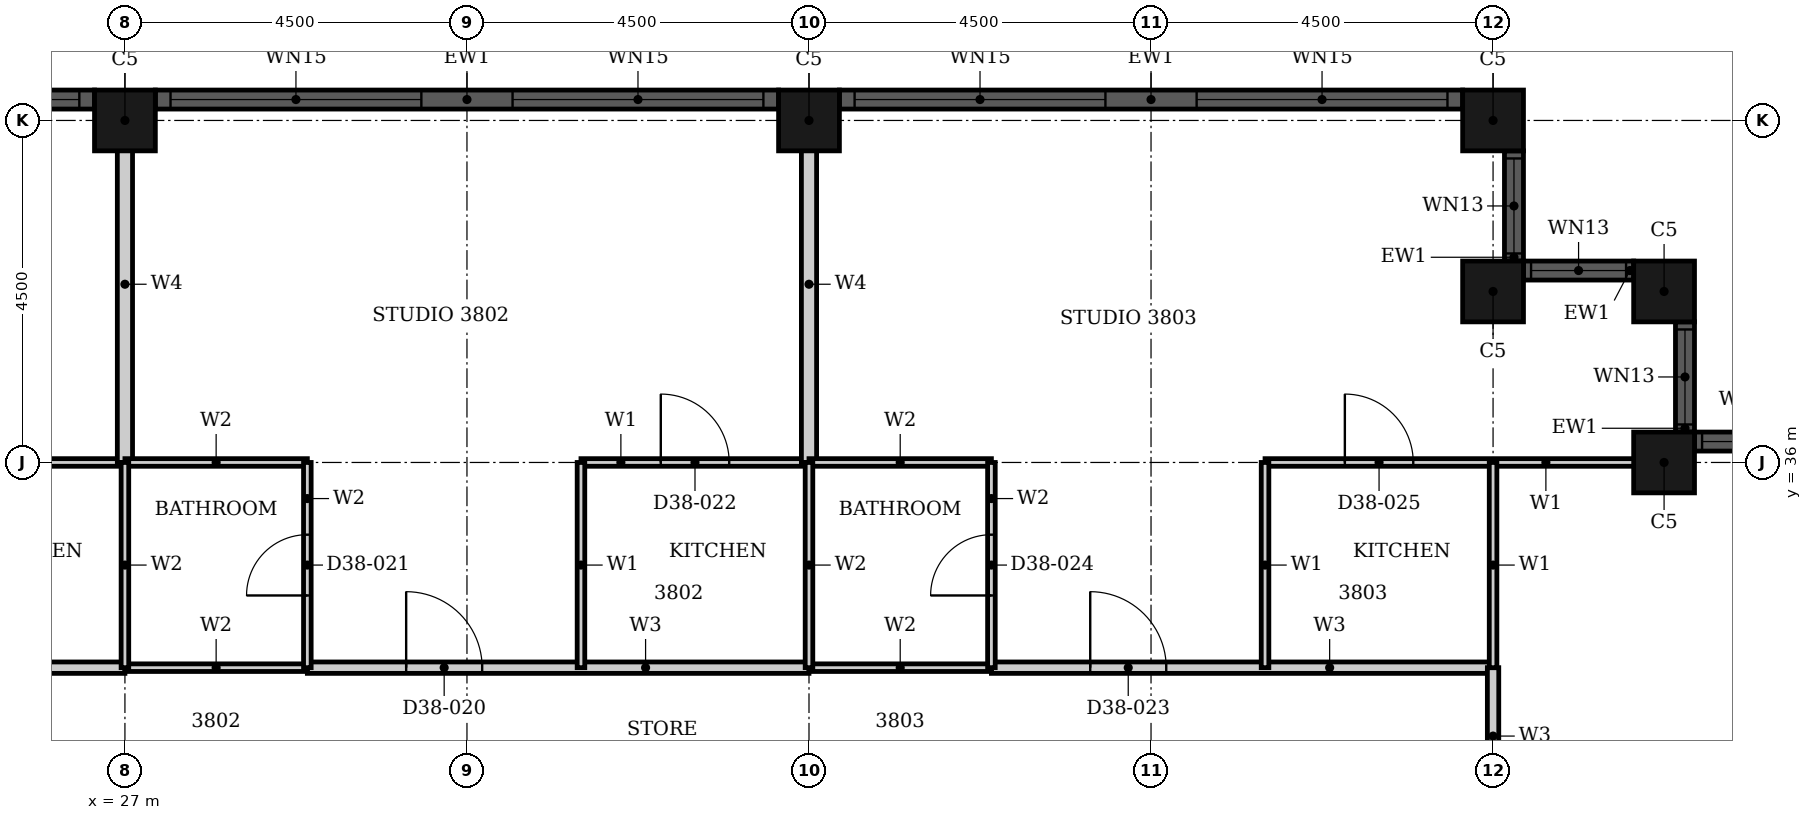
"""IFC4 building model, lengths in metres.
Left out: names, types, materials, properties, quantities, classifications, styles, units other than length and angle.
Written with IfcOpenShell. Run it as: python <this file> out.ifc"""

import sys

from ifc_helpers import new_model, si_unit, direction, frame, frame_2d, origin, origin_2d, place, context, subcontext, project, spatial, rectangle, hollow_rectangle, extrude, element, fill, save


model = new_model("IFC4")
c1 = context("Model", 3, precision=1e-05, world=origin(), true_north=direction((0.0, 1.0)))
c2 = subcontext(c1, "Body", "Model", "MODEL_VIEW")
j1 = project(units=[si_unit("LENGTHUNIT", "METRE"), si_unit("PLANEANGLEUNIT", "RADIAN")], contexts=[c1])
p1 = place(None, origin())
s1 = spatial("IfcSite", under=j1, at=p1, CompositionType="ELEMENT")
p2 = place(p1, origin())
s2 = spatial("IfcBuilding", under=s1, at=p2, CompositionType="ELEMENT")
p3 = place(p2, frame((0.0, 0.0, 154.3)))
s3 = spatial("IfcBuildingStorey", under=s2, at=p3, CompositionType="ELEMENT", Elevation=154.3)
for number, where, z_axis, x_axis in (
    (1, (47.25, 36.0, 0.0), (0.0, 0.0, 1.0), (1.0, 0.0, 0.0)),
    (2, (47.25, 38.25, 0.0), (0.0, 0.0, 1.0), (1.0, 0.0, 0.0)),
    (3, (45.0, 38.25, 0.0), (0.0, 0.0, 1.0), (1.0, 0.0, 0.0)),
    (4, (45.0, 40.5, 0.0), (0.0, 0.0, 1.0), (1.0, 0.0, 0.0)),
    (5, (36.0, 40.5, 0.0), (0.0, 0.0, 1.0), (1.0, 0.0, 0.0)),
    (6, (27.0, 40.5, 0.0), (0.0, 0.0, 1.0), (1.0, 0.0, 0.0)),
):
    element("IfcColumn", number, at=place(p3, frame(where, z_axis=z_axis, x_axis=x_axis)), inside=s3, PredefinedType="COLUMN", context=c2, shape_type="SweptSolid", body=[
        extrude(hollow_rectangle(XDim=0.8, YDim=0.8, WallThickness=0.025, at=origin_2d()), origin(), (0.0, 0.0, 1.0), 3.7),
    ])
p4 = place(p3, frame((49.1, 36.275, 0.0), z_axis=(0.0, 0.0, 1.0), x_axis=(-1.0, 0.0, 0.0)))
e7 = element("IfcWall", 7, at=p4, inside=s3, PredefinedType="SOLIDWALL", context=c2, shape_type="SweptSolid", body=[
    extrude(rectangle(XDim=1.45, YDim=0.25, at=frame_2d((0.725, 0.0))), origin(), (0.0, 0.0, 1.0), 3.7),
])
p5 = place(p4, frame((0.1, 0.0, 0.9)))
e8 = element("IfcOpeningElement", 8, at=p5, cuts=e7, PredefinedType="OPENING", context=c2, shape_type="SweptSolid", body=[
    extrude(rectangle(XDim=1.25, YDim=1.85, at=frame_2d((0.625, 0.925))), frame((0.0, 0.135, 0.0), z_axis=(0.0, -1.0, 0.0), x_axis=(1.0, 0.0, 0.0)), (0.0, 0.0, 1.0), 0.27),
])
p6 = place(p3, frame((47.525, 36.4, 0.0), z_axis=(0.0, 0.0, 1.0), x_axis=(0.0, 1.0, 0.0)))
e9 = element("IfcWall", 9, at=p6, inside=s3, PredefinedType="SOLIDWALL", context=c2, shape_type="SweptSolid", body=[
    extrude(rectangle(XDim=1.45, YDim=0.25, at=frame_2d((0.725, 0.0))), origin(), (0.0, 0.0, 1.0), 3.7),
])
p7 = place(p6, frame((0.1, 0.0, 0.9)))
e10 = element("IfcOpeningElement", 10, at=p7, cuts=e9, PredefinedType="OPENING", context=c2, shape_type="SweptSolid", body=[
    extrude(rectangle(XDim=1.25, YDim=1.85, at=frame_2d((0.625, 0.925))), frame((0.0, 0.135, 0.0), z_axis=(0.0, -1.0, 0.0), x_axis=(1.0, 0.0, 0.0)), (0.0, 0.0, 1.0), 0.27),
])
p8 = place(p3, frame((46.85, 38.525, 0.0), z_axis=(0.0, 0.0, 1.0), x_axis=(-1.0, 0.0, 0.0)))
e11 = element("IfcWall", 11, at=p8, inside=s3, PredefinedType="SOLIDWALL", context=c2, shape_type="SweptSolid", body=[
    extrude(rectangle(XDim=1.45, YDim=0.25, at=frame_2d((0.725, 0.0))), origin(), (0.0, 0.0, 1.0), 3.7),
])
p9 = place(p8, frame((0.1, 0.0, 0.9)))
e12 = element("IfcOpeningElement", 12, at=p9, cuts=e11, PredefinedType="OPENING", context=c2, shape_type="SweptSolid", body=[
    extrude(rectangle(XDim=1.25, YDim=1.85, at=frame_2d((0.625, 0.925))), frame((0.0, 0.135, 0.0), z_axis=(0.0, -1.0, 0.0), x_axis=(1.0, 0.0, 0.0)), (0.0, 0.0, 1.0), 0.27),
])
p10 = place(p3, frame((45.275, 38.65, 0.0), z_axis=(0.0, 0.0, 1.0), x_axis=(0.0, 1.0, 0.0)))
e13 = element("IfcWall", 13, at=p10, inside=s3, PredefinedType="SOLIDWALL", context=c2, shape_type="SweptSolid", body=[
    extrude(rectangle(XDim=1.45, YDim=0.25, at=frame_2d((0.725, 0.0))), origin(), (0.0, 0.0, 1.0), 3.7),
])
p11 = place(p10, frame((0.1, 0.0, 0.9)))
e14 = element("IfcOpeningElement", 14, at=p11, cuts=e13, PredefinedType="OPENING", context=c2, shape_type="SweptSolid", body=[
    extrude(rectangle(XDim=1.25, YDim=1.85, at=frame_2d((0.625, 0.925))), frame((0.0, 0.135, 0.0), z_axis=(0.0, -1.0, 0.0), x_axis=(1.0, 0.0, 0.0)), (0.0, 0.0, 1.0), 0.27),
])
p12 = place(p3, frame((44.6, 40.775, 0.0), z_axis=(0.0, 0.0, 1.0), x_axis=(-1.0, 0.0, 0.0)))
e15 = element("IfcWall", 15, at=p12, inside=s3, PredefinedType="SOLIDWALL", context=c2, shape_type="SweptSolid", body=[
    extrude(rectangle(XDim=8.2, YDim=0.25, at=frame_2d((4.1, 0.0))), origin(), (0.0, 0.0, 1.0), 3.7),
])
p13 = place(p12, frame((0.2, 0.0, 0.45)))
e16 = element("IfcOpeningElement", 16, at=p13, cuts=e15, PredefinedType="OPENING", context=c2, shape_type="SweptSolid", body=[
    extrude(rectangle(XDim=3.3, YDim=2.3, at=frame_2d((1.65, 1.15))), frame((0.0, 0.135, 0.0), z_axis=(0.0, -1.0, 0.0), x_axis=(1.0, 0.0, 0.0)), (0.0, 0.0, 1.0), 0.27),
])
p14 = place(p12, frame((4.7, 0.0, 0.45)))
e17 = element("IfcOpeningElement", 17, at=p14, cuts=e15, PredefinedType="OPENING", context=c2, shape_type="SweptSolid", body=[
    extrude(rectangle(XDim=3.3, YDim=2.3, at=frame_2d((1.65, 1.15))), frame((0.0, 0.135, 0.0), z_axis=(0.0, -1.0, 0.0), x_axis=(1.0, 0.0, 0.0)), (0.0, 0.0, 1.0), 0.27),
])
p15 = place(p3, frame((35.6, 40.775, 0.0), z_axis=(0.0, 0.0, 1.0), x_axis=(-1.0, 0.0, 0.0)))
e18 = element("IfcWall", 18, at=p15, inside=s3, PredefinedType="SOLIDWALL", context=c2, shape_type="SweptSolid", body=[
    extrude(rectangle(XDim=8.2, YDim=0.25, at=frame_2d((4.1, 0.0))), origin(), (0.0, 0.0, 1.0), 3.7),
])
p16 = place(p15, frame((0.2, 0.0, 0.45)))
e19 = element("IfcOpeningElement", 19, at=p16, cuts=e18, PredefinedType="OPENING", context=c2, shape_type="SweptSolid", body=[
    extrude(rectangle(XDim=3.3, YDim=2.3, at=frame_2d((1.65, 1.15))), frame((0.0, 0.135, 0.0), z_axis=(0.0, -1.0, 0.0), x_axis=(1.0, 0.0, 0.0)), (0.0, 0.0, 1.0), 0.27),
])
p17 = place(p15, frame((4.7, 0.0, 0.45)))
e20 = element("IfcOpeningElement", 20, at=p17, cuts=e18, PredefinedType="OPENING", context=c2, shape_type="SweptSolid", body=[
    extrude(rectangle(XDim=3.3, YDim=2.3, at=frame_2d((1.65, 1.15))), frame((0.0, 0.135, 0.0), z_axis=(0.0, -1.0, 0.0), x_axis=(1.0, 0.0, 0.0)), (0.0, 0.0, 1.0), 0.27),
])
p18 = place(p3, frame((26.6, 40.775, 0.0), z_axis=(0.0, 0.0, 1.0), x_axis=(-1.0, 0.0, 0.0)))
e21 = element("IfcWall", 21, at=p18, inside=s3, PredefinedType="SOLIDWALL", context=c2, shape_type="SweptSolid", body=[
    extrude(rectangle(XDim=8.2, YDim=0.25, at=frame_2d((4.1, 0.0))), origin(), (0.0, 0.0, 1.0), 3.7),
])
p19 = place(p18, frame((0.2, 0.0, 0.45)))
e22 = element("IfcOpeningElement", 22, at=p19, cuts=e21, PredefinedType="OPENING", context=c2, shape_type="SweptSolid", body=[
    extrude(rectangle(XDim=3.3, YDim=2.3, at=frame_2d((1.65, 1.15))), frame((0.0, 0.135, 0.0), z_axis=(0.0, -1.0, 0.0), x_axis=(1.0, 0.0, 0.0)), (0.0, 0.0, 1.0), 0.27),
])
p20 = place(p18, frame((4.7, 0.0, 0.45)))
e23 = element("IfcOpeningElement", 23, at=p20, cuts=e21, PredefinedType="OPENING", context=c2, shape_type="SweptSolid", body=[
    extrude(rectangle(XDim=3.3, YDim=2.3, at=frame_2d((1.65, 1.15))), frame((0.0, 0.135, 0.0), z_axis=(0.0, -1.0, 0.0), x_axis=(1.0, 0.0, 0.0)), (0.0, 0.0, 1.0), 0.27),
])
p21 = place(p3, frame((20.4, 33.3, 0.0), z_axis=(0.0, 0.0, 1.0), x_axis=(1.0, 0.0, 0.0)))
e24 = element("IfcWall", 24, at=p21, inside=s3, PredefinedType="PARTITIONING", context=c2, shape_type="SweptSolid", body=[
    extrude(rectangle(XDim=6.6, YDim=0.15, at=frame_2d((3.3, 0.0))), origin(), (0.0, 0.0, 1.0), 3.4),
])
p22 = place(p21, frame((1.3, 0.0, 0.0)))
e25 = element("IfcOpeningElement", 25, at=p22, cuts=e24, PredefinedType="OPENING", context=c2, shape_type="SweptSolid", body=[
    extrude(rectangle(XDim=1.0, YDim=2.2, at=frame_2d((0.5, 1.1))), frame((0.0, 0.085, 0.0), z_axis=(0.0, -1.0, 0.0), x_axis=(1.0, 0.0, 0.0)), (0.0, 0.0, 1.0), 0.17),
])
p23 = place(p3, frame((29.4, 33.3, 0.0), z_axis=(0.0, 0.0, 1.0), x_axis=(1.0, 0.0, 0.0)))
e26 = element("IfcWall", 26, at=p23, inside=s3, PredefinedType="PARTITIONING", context=c2, shape_type="SweptSolid", body=[
    extrude(rectangle(XDim=6.6, YDim=0.15, at=frame_2d((3.3, 0.0))), origin(), (0.0, 0.0, 1.0), 3.4),
])
p24 = place(p23, frame((1.3, 0.0, 0.0)))
e27 = element("IfcOpeningElement", 27, at=p24, cuts=e26, PredefinedType="OPENING", context=c2, shape_type="SweptSolid", body=[
    extrude(rectangle(XDim=1.0, YDim=2.2, at=frame_2d((0.5, 1.1))), frame((0.0, 0.085, 0.0), z_axis=(0.0, -1.0, 0.0), x_axis=(1.0, 0.0, 0.0)), (0.0, 0.0, 1.0), 0.17),
])
p25 = place(p3, frame((38.4, 33.3, 0.0), z_axis=(0.0, 0.0, 1.0), x_axis=(1.0, 0.0, 0.0)))
e28 = element("IfcWall", 28, at=p25, inside=s3, PredefinedType="PARTITIONING", context=c2, shape_type="SweptSolid", body=[
    extrude(rectangle(XDim=6.6, YDim=0.15, at=frame_2d((3.3, 0.0))), origin(), (0.0, 0.0, 1.0), 3.4),
])
p26 = place(p25, frame((1.3, 0.0, 0.0)))
e29 = element("IfcOpeningElement", 29, at=p26, cuts=e28, PredefinedType="OPENING", context=c2, shape_type="SweptSolid", body=[
    extrude(rectangle(XDim=1.0, YDim=2.2, at=frame_2d((0.5, 1.1))), frame((0.0, 0.085, 0.0), z_axis=(0.0, -1.0, 0.0), x_axis=(1.0, 0.0, 0.0)), (0.0, 0.0, 1.0), 0.17),
])
p27 = place(p3, frame((45.0, 31.5, 0.0), z_axis=(0.0, 0.0, 1.0), x_axis=(0.0, 1.0, 0.0)))
e30 = element("IfcWall", 30, at=p27, inside=s3, PredefinedType="PARTITIONING", context=c2, shape_type="SweptSolid", body=[
    extrude(rectangle(XDim=1.8, YDim=0.15, at=frame_2d((0.9, 0.0))), origin(), (0.0, 0.0, 1.0), 3.4),
])
p28 = place(p3, frame((24.0, 36.0, 0.0), z_axis=(0.0, 0.0, 1.0), x_axis=(1.0, 0.0, 0.0)))
e31 = element("IfcWall", 31, at=p28, inside=s3, PredefinedType="PARTITIONING", context=c2, shape_type="SweptSolid", body=[
    extrude(rectangle(XDim=3.0, YDim=0.1, at=frame_2d((1.5, 0.0))), origin(), (0.0, 0.0, 1.0), 3.4),
])
p29 = place(p28, frame((1.05, 0.0, 0.0)))
e32 = element("IfcOpeningElement", 32, at=p29, cuts=e31, PredefinedType="OPENING", context=c2, shape_type="SweptSolid", body=[
    extrude(rectangle(XDim=0.9, YDim=2.1, at=frame_2d((0.45, 1.05))), frame((0.0, 0.06, 0.0), z_axis=(0.0, -1.0, 0.0), x_axis=(1.0, 0.0, 0.0)), (0.0, 0.0, 1.0), 0.12),
])
p30 = place(p3, frame((33.0, 36.0, 0.0), z_axis=(0.0, 0.0, 1.0), x_axis=(1.0, 0.0, 0.0)))
e33 = element("IfcWall", 33, at=p30, inside=s3, PredefinedType="PARTITIONING", context=c2, shape_type="SweptSolid", body=[
    extrude(rectangle(XDim=3.0, YDim=0.1, at=frame_2d((1.5, 0.0))), origin(), (0.0, 0.0, 1.0), 3.4),
])
p31 = place(p30, frame((1.05, 0.0, 0.0)))
e34 = element("IfcOpeningElement", 34, at=p31, cuts=e33, PredefinedType="OPENING", context=c2, shape_type="SweptSolid", body=[
    extrude(rectangle(XDim=0.9, YDim=2.1, at=frame_2d((0.45, 1.05))), frame((0.0, 0.06, 0.0), z_axis=(0.0, -1.0, 0.0), x_axis=(1.0, 0.0, 0.0)), (0.0, 0.0, 1.0), 0.12),
])
p32 = place(p3, frame((42.0, 36.0, 0.0), z_axis=(0.0, 0.0, 1.0), x_axis=(1.0, 0.0, 0.0)))
e35 = element("IfcWall", 35, at=p32, inside=s3, PredefinedType="PARTITIONING", context=c2, shape_type="SweptSolid", body=[
    extrude(rectangle(XDim=5.44, YDim=0.1, at=frame_2d((2.72, 0.0))), origin(), (0.0, 0.0, 1.0), 3.4),
])
p33 = place(p32, frame((1.05, 0.0, 0.0)))
e36 = element("IfcOpeningElement", 36, at=p33, cuts=e35, PredefinedType="OPENING", context=c2, shape_type="SweptSolid", body=[
    extrude(rectangle(XDim=0.9, YDim=2.1, at=frame_2d((0.45, 1.05))), frame((0.0, 0.06, 0.0), z_axis=(0.0, -1.0, 0.0), x_axis=(1.0, 0.0, 0.0)), (0.0, 0.0, 1.0), 0.12),
])
for number, where, z_axis, x_axis in (
    (37, (33.0, 33.3, 0.0), (0.0, 0.0, 1.0), (0.0, 1.0, 0.0)),
    (38, (42.0, 33.3, 0.0), (0.0, 0.0, 1.0), (0.0, 1.0, 0.0)),
    (39, (45.0, 33.3, 0.0), (0.0, 0.0, 1.0), (0.0, 1.0, 0.0)),
):
    element("IfcWall", number, at=place(p3, frame(where, z_axis=z_axis, x_axis=x_axis)), inside=s3, PredefinedType="PARTITIONING", context=c2, shape_type="SweptSolid", body=[
        extrude(rectangle(XDim=2.7, YDim=0.1, at=frame_2d((1.35, 0.0))), origin(), (0.0, 0.0, 1.0), 3.4),
    ])
for number, where, z_axis, x_axis in (
    (40, (27.0, 36.0, 0.0), (0.0, 0.0, 1.0), (0.0, 1.0, 0.0)),
    (41, (36.0, 36.0, 0.0), (0.0, 0.0, 1.0), (0.0, 1.0, 0.0)),
):
    element("IfcWall", number, at=place(p3, frame(where, z_axis=z_axis, x_axis=x_axis)), inside=s3, PredefinedType="PARTITIONING", context=c2, shape_type="SweptSolid", body=[
        extrude(rectangle(XDim=4.69, YDim=0.2, at=frame_2d((2.345, 0.0))), origin(), (0.0, 0.0, 1.0), 3.4),
    ])
for number, where, z_axis, x_axis in (
    (42, (27.0, 33.3, 0.0), (0.0, 0.0, 1.0), (1.0, 0.0, 0.0)),
    (43, (36.0, 33.3, 0.0), (0.0, 0.0, 1.0), (1.0, 0.0, 0.0)),
    (44, (27.0, 36.0, 0.0), (0.0, 0.0, 1.0), (1.0, 0.0, 0.0)),
    (45, (36.0, 36.0, 0.0), (0.0, 0.0, 1.0), (1.0, 0.0, 0.0)),
):
    element("IfcWall", number, at=place(p3, frame(where, z_axis=z_axis, x_axis=x_axis)), inside=s3, PredefinedType="PARTITIONING", context=c2, shape_type="SweptSolid", body=[
        extrude(rectangle(XDim=2.4, YDim=0.1, at=frame_2d((1.2, 0.0))), origin(), (0.0, 0.0, 1.0), 3.4),
    ])
p34 = place(p3, frame((27.0, 33.3, 0.0), z_axis=(0.0, 0.0, 1.0), x_axis=(0.0, 1.0, 0.0)))
e46 = element("IfcWall", 46, at=p34, inside=s3, PredefinedType="PARTITIONING", context=c2, shape_type="SweptSolid", body=[
    extrude(rectangle(XDim=2.7, YDim=0.1, at=frame_2d((1.35, 0.0))), origin(), (0.0, 0.0, 1.0), 3.4),
])
p35 = place(p3, frame((29.4, 33.3, 0.0), z_axis=(0.0, 0.0, 1.0), x_axis=(0.0, 1.0, 0.0)))
e47 = element("IfcWall", 47, at=p35, inside=s3, PredefinedType="PARTITIONING", context=c2, shape_type="SweptSolid", body=[
    extrude(rectangle(XDim=2.7, YDim=0.1, at=frame_2d((1.35, 0.0))), origin(), (0.0, 0.0, 1.0), 3.4),
])
p36 = place(p35, frame((0.95, 0.0, 0.0)))
e48 = element("IfcOpeningElement", 48, at=p36, cuts=e47, PredefinedType="OPENING", context=c2, shape_type="SweptSolid", body=[
    extrude(rectangle(XDim=0.8, YDim=2.1, at=frame_2d((0.4, 1.05))), frame((0.0, 0.06, 0.0), z_axis=(0.0, -1.0, 0.0), x_axis=(1.0, 0.0, 0.0)), (0.0, 0.0, 1.0), 0.12),
])
p37 = place(p3, frame((36.0, 33.3, 0.0), z_axis=(0.0, 0.0, 1.0), x_axis=(0.0, 1.0, 0.0)))
e49 = element("IfcWall", 49, at=p37, inside=s3, PredefinedType="PARTITIONING", context=c2, shape_type="SweptSolid", body=[
    extrude(rectangle(XDim=2.7, YDim=0.1, at=frame_2d((1.35, 0.0))), origin(), (0.0, 0.0, 1.0), 3.4),
])
p38 = place(p3, frame((38.4, 33.3, 0.0), z_axis=(0.0, 0.0, 1.0), x_axis=(0.0, 1.0, 0.0)))
e50 = element("IfcWall", 50, at=p38, inside=s3, PredefinedType="PARTITIONING", context=c2, shape_type="SweptSolid", body=[
    extrude(rectangle(XDim=2.7, YDim=0.1, at=frame_2d((1.35, 0.0))), origin(), (0.0, 0.0, 1.0), 3.4),
])
p39 = place(p38, frame((0.95, 0.0, 0.0)))
e51 = element("IfcOpeningElement", 51, at=p39, cuts=e50, PredefinedType="OPENING", context=c2, shape_type="SweptSolid", body=[
    extrude(rectangle(XDim=0.8, YDim=2.1, at=frame_2d((0.4, 1.05))), frame((0.0, 0.06, 0.0), z_axis=(0.0, -1.0, 0.0), x_axis=(1.0, 0.0, 0.0)), (0.0, 0.0, 1.0), 0.12),
])
p40 = place(p5, origin())
e52 = element("IfcWindow", 52, at=p40, inside=s3, PartitioningType="SINGLE_PANEL", PredefinedType="WINDOW", context=c2, shape_type="SweptSolid", body=[
    extrude(rectangle(XDim=1.25, YDim=1.85, at=frame_2d((0.625, 0.925))), frame((0.0, 0.03, 0.0), z_axis=(0.0, -1.0, 0.0), x_axis=(1.0, 0.0, 0.0)), (0.0, 0.0, 1.0), 0.06),
])
fill(e8, e52)
p41 = place(p7, origin())
e53 = element("IfcWindow", 53, at=p41, inside=s3, PartitioningType="SINGLE_PANEL", PredefinedType="WINDOW", context=c2, shape_type="SweptSolid", body=[
    extrude(rectangle(XDim=1.25, YDim=1.85, at=frame_2d((0.625, 0.925))), frame((0.0, 0.03, 0.0), z_axis=(0.0, -1.0, 0.0), x_axis=(1.0, 0.0, 0.0)), (0.0, 0.0, 1.0), 0.06),
])
fill(e10, e53)
p42 = place(p9, origin())
e54 = element("IfcWindow", 54, at=p42, inside=s3, PartitioningType="SINGLE_PANEL", PredefinedType="WINDOW", context=c2, shape_type="SweptSolid", body=[
    extrude(rectangle(XDim=1.25, YDim=1.85, at=frame_2d((0.625, 0.925))), frame((0.0, 0.03, 0.0), z_axis=(0.0, -1.0, 0.0), x_axis=(1.0, 0.0, 0.0)), (0.0, 0.0, 1.0), 0.06),
])
fill(e12, e54)
p43 = place(p11, origin())
e55 = element("IfcWindow", 55, at=p43, inside=s3, PartitioningType="SINGLE_PANEL", PredefinedType="WINDOW", context=c2, shape_type="SweptSolid", body=[
    extrude(rectangle(XDim=1.25, YDim=1.85, at=frame_2d((0.625, 0.925))), frame((0.0, 0.03, 0.0), z_axis=(0.0, -1.0, 0.0), x_axis=(1.0, 0.0, 0.0)), (0.0, 0.0, 1.0), 0.06),
])
fill(e14, e55)
p44 = place(p13, origin())
e56 = element("IfcWindow", 56, at=p44, inside=s3, PartitioningType="SINGLE_PANEL", PredefinedType="WINDOW", context=c2, shape_type="SweptSolid", body=[
    extrude(rectangle(XDim=3.3, YDim=2.3, at=frame_2d((1.65, 1.15))), frame((0.0, 0.03, 0.0), z_axis=(0.0, -1.0, 0.0), x_axis=(1.0, 0.0, 0.0)), (0.0, 0.0, 1.0), 0.06),
])
fill(e16, e56)
p45 = place(p14, origin())
e57 = element("IfcWindow", 57, at=p45, inside=s3, PartitioningType="SINGLE_PANEL", PredefinedType="WINDOW", context=c2, shape_type="SweptSolid", body=[
    extrude(rectangle(XDim=3.3, YDim=2.3, at=frame_2d((1.65, 1.15))), frame((0.0, 0.03, 0.0), z_axis=(0.0, -1.0, 0.0), x_axis=(1.0, 0.0, 0.0)), (0.0, 0.0, 1.0), 0.06),
])
fill(e17, e57)
p46 = place(p16, origin())
e58 = element("IfcWindow", 58, at=p46, inside=s3, PartitioningType="SINGLE_PANEL", PredefinedType="WINDOW", context=c2, shape_type="SweptSolid", body=[
    extrude(rectangle(XDim=3.3, YDim=2.3, at=frame_2d((1.65, 1.15))), frame((0.0, 0.03, 0.0), z_axis=(0.0, -1.0, 0.0), x_axis=(1.0, 0.0, 0.0)), (0.0, 0.0, 1.0), 0.06),
])
fill(e19, e58)
p47 = place(p17, origin())
e59 = element("IfcWindow", 59, at=p47, inside=s3, PartitioningType="SINGLE_PANEL", PredefinedType="WINDOW", context=c2, shape_type="SweptSolid", body=[
    extrude(rectangle(XDim=3.3, YDim=2.3, at=frame_2d((1.65, 1.15))), frame((0.0, 0.03, 0.0), z_axis=(0.0, -1.0, 0.0), x_axis=(1.0, 0.0, 0.0)), (0.0, 0.0, 1.0), 0.06),
])
fill(e20, e59)
p48 = place(p19, origin())
e60 = element("IfcWindow", 60, at=p48, inside=s3, PartitioningType="SINGLE_PANEL", PredefinedType="WINDOW", context=c2, shape_type="SweptSolid", body=[
    extrude(rectangle(XDim=3.3, YDim=2.3, at=frame_2d((1.65, 1.15))), frame((0.0, 0.03, 0.0), z_axis=(0.0, -1.0, 0.0), x_axis=(1.0, 0.0, 0.0)), (0.0, 0.0, 1.0), 0.06),
])
fill(e22, e60)
p49 = place(p24, origin())
e61 = element("IfcDoor", 61, at=p49, inside=s3, OperationType="SINGLE_SWING_LEFT", PredefinedType="DOOR", context=c2, shape_type="SweptSolid", body=[
    extrude(rectangle(XDim=1.0, YDim=2.2, at=frame_2d((0.5, 1.1))), frame((0.0, 0.025, 0.0), z_axis=(0.0, -1.0, 0.0), x_axis=(1.0, 0.0, 0.0)), (0.0, 0.0, 1.0), 0.05),
])
fill(e27, e61)
p50 = place(p36, origin())
e62 = element("IfcDoor", 62, at=p50, inside=s3, OperationType="SINGLE_SWING_RIGHT", PredefinedType="DOOR", context=c2, shape_type="SweptSolid", body=[
    extrude(rectangle(XDim=0.8, YDim=2.1, at=frame_2d((0.4, 1.05))), frame((0.0, 0.025, 0.0), z_axis=(0.0, -1.0, 0.0), x_axis=(1.0, 0.0, 0.0)), (0.0, 0.0, 1.0), 0.05),
])
fill(e48, e62)
p51 = place(p31, origin())
e63 = element("IfcDoor", 63, at=p51, inside=s3, OperationType="SINGLE_SWING_LEFT", PredefinedType="DOOR", context=c2, shape_type="SweptSolid", body=[
    extrude(rectangle(XDim=0.9, YDim=2.1, at=frame_2d((0.45, 1.05))), frame((0.0, 0.025, 0.0), z_axis=(0.0, -1.0, 0.0), x_axis=(1.0, 0.0, 0.0)), (0.0, 0.0, 1.0), 0.05),
])
fill(e34, e63)
p52 = place(p26, origin())
e64 = element("IfcDoor", 64, at=p52, inside=s3, OperationType="SINGLE_SWING_LEFT", PredefinedType="DOOR", context=c2, shape_type="SweptSolid", body=[
    extrude(rectangle(XDim=1.0, YDim=2.2, at=frame_2d((0.5, 1.1))), frame((0.0, 0.025, 0.0), z_axis=(0.0, -1.0, 0.0), x_axis=(1.0, 0.0, 0.0)), (0.0, 0.0, 1.0), 0.05),
])
fill(e29, e64)
p53 = place(p39, origin())
e65 = element("IfcDoor", 65, at=p53, inside=s3, OperationType="SINGLE_SWING_RIGHT", PredefinedType="DOOR", context=c2, shape_type="SweptSolid", body=[
    extrude(rectangle(XDim=0.8, YDim=2.1, at=frame_2d((0.4, 1.05))), frame((0.0, 0.025, 0.0), z_axis=(0.0, -1.0, 0.0), x_axis=(1.0, 0.0, 0.0)), (0.0, 0.0, 1.0), 0.05),
])
fill(e51, e65)
p54 = place(p33, origin())
e66 = element("IfcDoor", 66, at=p54, inside=s3, OperationType="SINGLE_SWING_LEFT", PredefinedType="DOOR", context=c2, shape_type="SweptSolid", body=[
    extrude(rectangle(XDim=0.9, YDim=2.1, at=frame_2d((0.45, 1.05))), frame((0.0, 0.025, 0.0), z_axis=(0.0, -1.0, 0.0), x_axis=(1.0, 0.0, 0.0)), (0.0, 0.0, 1.0), 0.05),
])
fill(e36, e66)
save(model, sys.argv[1])
